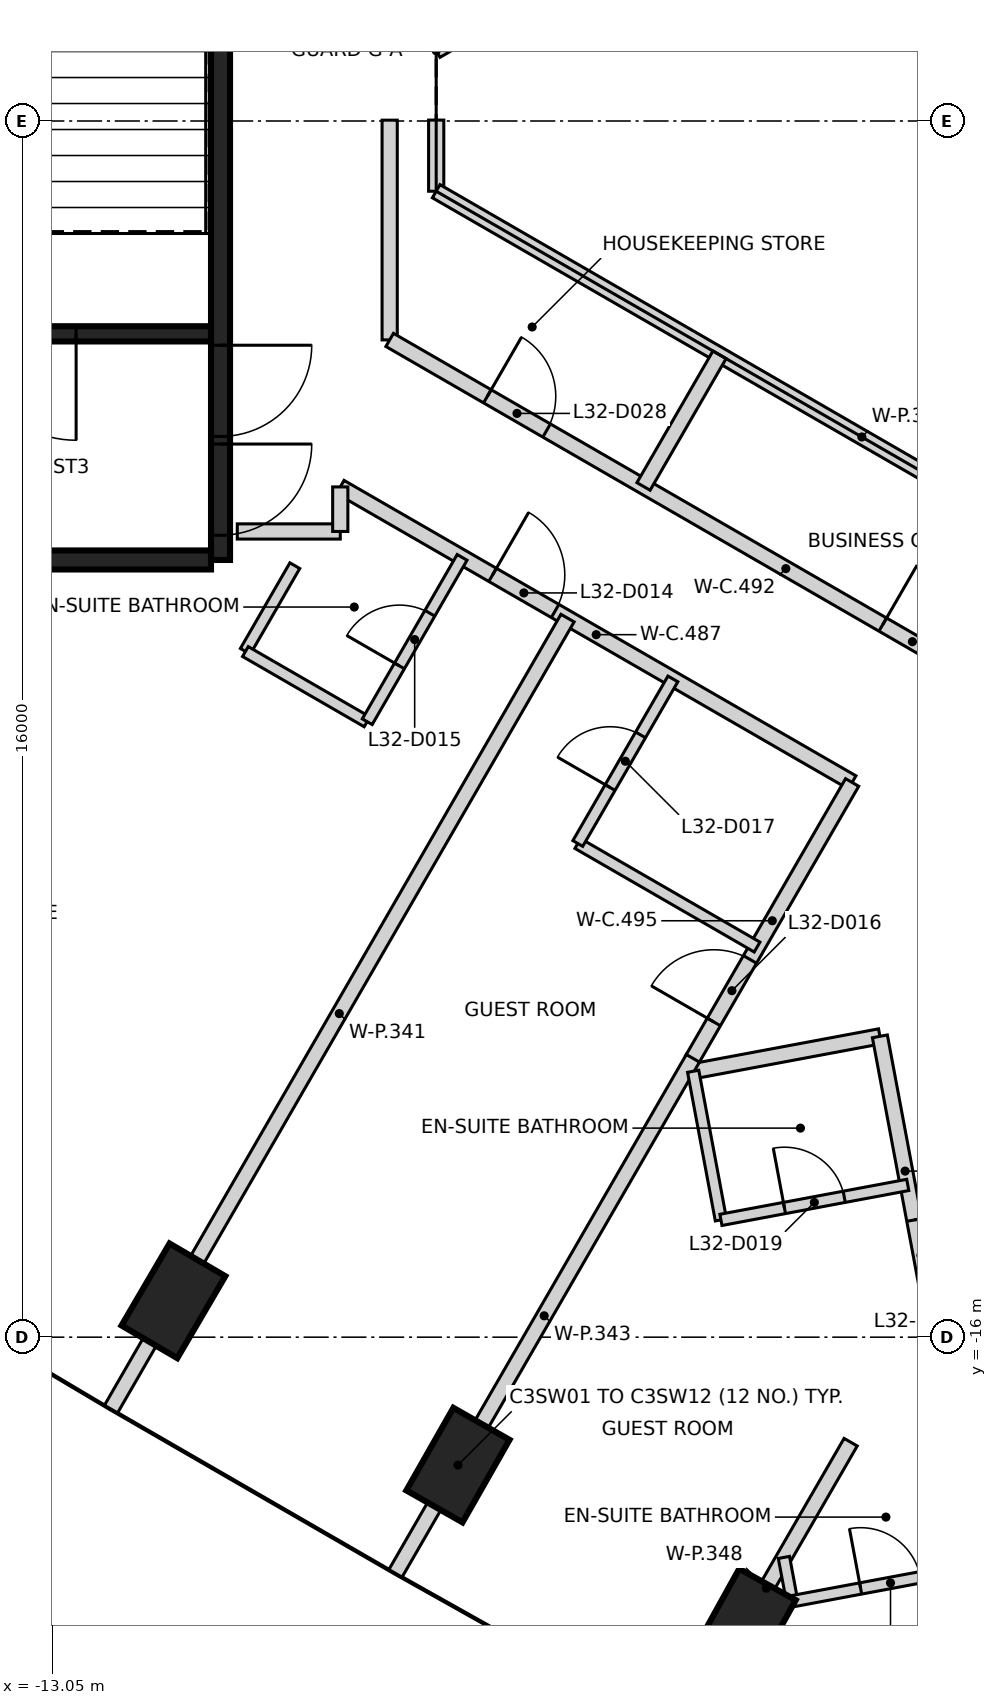
"""IFC4 building model, lengths in metres.
Left out: names, types, materials, properties, quantities, classifications, styles, units other than length and angle.
Written with IfcOpenShell. Run it as: python <this file> out.ifc"""

import sys

from ifc_helpers import new_model, si_unit, direction, frame, frame_2d, origin, origin_2d, place, context, subcontext, project, spatial, rectangle, extrude, element, fill, save


model = new_model("IFC4")
c1 = context("Model", 3, precision=1e-05, world=origin(), true_north=direction((0.0, 1.0)))
c2 = subcontext(c1, "Body", "Model", "MODEL_VIEW")
j1 = project(units=[si_unit("LENGTHUNIT", "METRE"), si_unit("PLANEANGLEUNIT", "RADIAN")], contexts=[c1])
p1 = place(None, origin())
s1 = spatial("IfcSite", under=j1, at=p1, CompositionType="ELEMENT")
p2 = place(p1, origin())
s2 = spatial("IfcBuilding", under=s1, at=p2, CompositionType="ELEMENT")
p3 = place(p2, frame((0.0, 0.0, 132.4)))
s3 = spatial("IfcBuildingStorey", under=s2, at=p3, CompositionType="ELEMENT", Elevation=132.4)
for number, where, z_axis, x_axis in (
    (1, (-11.457, -15.522, -0.4), (0.0, 0.0, 1.0), (0.505, 0.863, 0.0)),
    (2, (-7.714, -17.683, -0.4), (0.0, 0.0, 1.0), (0.495, 0.869, 0.0)),
    (3, (-3.945, -19.8, -0.4), (0.0, 0.0, 1.0), (0.485, 0.875, 0.0)),
):
    element("IfcColumn", number, at=place(p3, frame(where, z_axis=z_axis, x_axis=x_axis)), inside=s3, PredefinedType="COLUMN", context=c2, shape_type="SweptSolid", body=[
        extrude(rectangle(XDim=1.25, YDim=0.85, at=origin_2d()), origin(), (0.0, 0.0, 1.0), 3.6),
    ])
p4 = place(p3, frame((-10.837, 5.775, 0.0), z_axis=(0.0, 0.0, 1.0), x_axis=(0.0, -1.0, 0.0)))
e4 = element("IfcWall", 4, at=p4, inside=s3, PredefinedType="SHEAR", context=c2, shape_type="SweptSolid", body=[
    extrude(rectangle(XDim=11.55, YDim=0.25, at=frame_2d((5.775, 0.0))), origin(), (0.0, 0.0, 1.0), 3.2),
])
p5 = place(p4, frame((10.025, 0.0, 0.0)))
e5 = element("IfcOpeningElement", 5, at=p5, cuts=e4, PredefinedType="OPENING", context=c2, shape_type="SweptSolid", body=[
    extrude(rectangle(XDim=1.2, YDim=2.1, at=frame_2d((0.6, 1.05))), frame((0.0, 0.135, 0.0), z_axis=(0.0, -1.0, 0.0), x_axis=(1.0, 0.0, 0.0)), (0.0, 0.0, 1.0), 0.27),
])
p6 = place(p4, frame((8.725, 0.0, 0.0)))
e6 = element("IfcOpeningElement", 6, at=p6, cuts=e4, PredefinedType="OPENING", context=c2, shape_type="SweptSolid", body=[
    extrude(rectangle(XDim=1.2, YDim=2.1, at=frame_2d((0.6, 1.05))), frame((0.0, 0.135, 0.0), z_axis=(0.0, -1.0, 0.0), x_axis=(1.0, 0.0, 0.0)), (0.0, 0.0, 1.0), 0.27),
])
p7 = place(p3, frame((-10.963, -5.775, 0.0), z_axis=(0.0, 0.0, 1.0), x_axis=(-1.0, 0.0, 0.0)))
e7 = element("IfcWall", 7, at=p7, inside=s3, PredefinedType="SHEAR", context=c2, shape_type="SweptSolid", body=[
    extrude(rectangle(XDim=5.225, YDim=0.25, at=frame_2d((2.612, 0.0))), origin(), (0.0, 0.0, 1.0), 3.2),
])
p8 = place(p3, frame((-10.963, -2.8, 0.0), z_axis=(0.0, 0.0, 1.0), x_axis=(-1.0, 0.0, 0.0)))
e8 = element("IfcWall", 8, at=p8, inside=s3, PredefinedType="SHEAR", context=c2, shape_type="SweptSolid", body=[
    extrude(rectangle(XDim=5.098, YDim=0.2, at=frame_2d((2.549, 0.0))), origin(), (0.0, 0.0, 1.0), 3.2),
])
p9 = place(p8, frame((1.774, 0.0, 0.0)))
e9 = element("IfcOpeningElement", 9, at=p9, cuts=e8, PredefinedType="OPENING", context=c2, shape_type="SweptSolid", body=[
    extrude(rectangle(XDim=1.4, YDim=2.1, at=frame_2d((0.7, 1.05))), frame((0.0, 0.11, 0.0), z_axis=(0.0, -1.0, 0.0), x_axis=(1.0, 0.0, 0.0)), (0.0, 0.0, 1.0), 0.22),
])
p10 = place(p3, frame((-10.617, -5.4, 0.0), z_axis=(0.0, 0.0, 1.0), x_axis=(1.0, 0.0, 0.0)))
e10 = element("IfcWall", 10, at=p10, inside=s3, PredefinedType="PARTITIONING", context=c2, shape_type="SweptSolid", body=[
    extrude(rectangle(XDim=1.355, YDim=0.2, at=frame_2d((0.677, 0.0))), origin(), (0.0, 0.0, 1.0), 3.2),
])
p11 = place(p3, frame((-9.262, -4.814, 0.0), z_axis=(0.0, 0.0, 1.0), x_axis=(0.866109782156, -0.499853823887, 0.0)))
e11 = element("IfcWall", 11, at=p11, inside=s3, PredefinedType="PARTITIONING", context=c2, shape_type="SweptSolid", body=[
    extrude(rectangle(XDim=7.776, YDim=0.2, at=frame_2d((3.888, 0.0))), origin(), (0.0, 0.0, 1.0), 3.2),
])
p12 = place(p11, frame((2.314, 0.0, 0.0)))
e12 = element("IfcOpeningElement", 12, at=p12, cuts=e11, PredefinedType="OPENING", context=c2, shape_type="SweptSolid", body=[
    extrude(rectangle(XDim=0.95, YDim=2.1, at=frame_2d((0.475, 1.05))), frame((0.0, 0.11, 0.0), z_axis=(0.0, -1.0, 0.0), x_axis=(1.0, 0.0, 0.0)), (0.0, 0.0, 1.0), 0.22),
])
p13 = place(p3, frame((-9.262, -5.4, 0.0), z_axis=(0.0, 0.0, 1.0), x_axis=(0.0, 1.0, 0.0)))
e13 = element("IfcWall", 13, at=p13, inside=s3, PredefinedType="PARTITIONING", context=c2, shape_type="SweptSolid", body=[
    extrude(rectangle(XDim=0.586, YDim=0.2, at=frame_2d((0.293, 0.0))), origin(), (0.0, 0.0, 1.0), 3.2),
])
p14 = place(p3, frame((-8.612, -2.88, 0.0), z_axis=(0.0, 0.0, 1.0), x_axis=(0.0, 1.0, 0.0)))
e14 = element("IfcWall", 14, at=p14, inside=s3, PredefinedType="PARTITIONING", context=c2, shape_type="SweptSolid", body=[
    extrude(rectangle(XDim=2.891, YDim=0.2, at=frame_2d((1.445, 0.0))), origin(), (0.0, 0.0, 1.0), 2.3),
])
p15 = place(p3, frame((-8.612, -2.88, 0.0), z_axis=(0.0, 0.0, 1.0), x_axis=(0.866035279512, -0.499982894348, 0.0)))
e15 = element("IfcWall", 15, at=p15, inside=s3, PredefinedType="PARTITIONING", context=c2, shape_type="SweptSolid", body=[
    extrude(rectangle(XDim=12.037, YDim=0.2, at=frame_2d((6.018, 0.0))), origin(), (0.0, 0.0, 1.0), 3.2),
])
p16 = place(p15, frame((1.484, 0.0, 0.0)))
e16 = element("IfcOpeningElement", 16, at=p16, cuts=e15, PredefinedType="OPENING", context=c2, shape_type="SweptSolid", body=[
    extrude(rectangle(XDim=0.9, YDim=2.1, at=frame_2d((0.45, 1.05))), frame((0.0, 0.11, 0.0), z_axis=(0.0, -1.0, 0.0), x_axis=(1.0, 0.0, 0.0)), (0.0, 0.0, 1.0), 0.22),
])
p17 = place(p15, frame((7.491, 0.0, 0.0)))
e17 = element("IfcOpeningElement", 17, at=p17, cuts=e15, PredefinedType="OPENING", context=c2, shape_type="SweptSolid", body=[
    extrude(rectangle(XDim=0.9, YDim=2.1, at=frame_2d((0.45, 1.05))), frame((0.0, 0.11, 0.0), z_axis=(0.0, -1.0, 0.0), x_axis=(1.0, 0.0, 0.0)), (0.0, 0.0, 1.0), 0.22),
])
p18 = place(p3, frame((-4.629, -12.341, 0.0), z_axis=(0.0, 0.0, 1.0), x_axis=(0.500069467685, 0.865985292883, 0.0)))
e18 = element("IfcWall", 18, at=p18, inside=s3, PredefinedType="PARTITIONING", context=c2, shape_type="SweptSolid", body=[
    extrude(rectangle(XDim=4.202, YDim=0.2, at=frame_2d((2.101, 0.0))), origin(), (0.0, 0.0, 1.0), 3.2),
])
p19 = place(p18, frame((0.564, 0.0, 0.0)))
e19 = element("IfcOpeningElement", 19, at=p19, cuts=e18, PredefinedType="OPENING", context=c2, shape_type="SweptSolid", body=[
    extrude(rectangle(XDim=0.95, YDim=2.1, at=frame_2d((0.475, 1.05))), frame((0.0, 0.11, 0.0), z_axis=(0.0, -1.0, 0.0), x_axis=(1.0, 0.0, 0.0)), (0.0, 0.0, 1.0), 0.22),
])
p20 = place(p3, frame((-4.6, -12.498, 0.0), z_axis=(0.0, 0.0, 1.0), x_axis=(0.982950102255, 0.183872500602, 0.0)))
e20 = element("IfcWall", 20, at=p20, inside=s3, PredefinedType="PARTITIONING", context=c2, shape_type="SweptSolid", body=[
    extrude(rectangle(XDim=2.48, YDim=0.2, at=frame_2d((1.24, 0.0))), origin(), (0.0, 0.0, 1.0), 3.2),
])
p21 = place(p3, frame((-2.163, -12.042, 0.0), z_axis=(0.0, 0.0, 1.0), x_axis=(0.183945287989, -0.982936483719, 0.0)))
e21 = element("IfcWall", 21, at=p21, inside=s3, PredefinedType="PARTITIONING", context=c2, shape_type="SweptSolid", body=[
    extrude(rectangle(XDim=3.607, YDim=0.2, at=frame_2d((1.804, 0.0))), origin(), (0.0, 0.0, 1.0), 3.2),
])
p22 = place(p21, frame((2.458, 0.0, 0.0)))
e22 = element("IfcOpeningElement", 22, at=p22, cuts=e21, PredefinedType="OPENING", context=c2, shape_type="SweptSolid", body=[
    extrude(rectangle(XDim=0.95, YDim=2.1, at=frame_2d((0.475, 1.05))), frame((0.0, 0.11, 0.0), z_axis=(0.0, -1.0, 0.0), x_axis=(1.0, 0.0, 0.0)), (0.0, 0.0, 1.0), 0.22),
])
p23 = place(p3, frame((-12.278, -16.946, 0.0), z_axis=(0.0, 0.0, 1.0), x_axis=(0.499887212932, 0.866090511637, 0.0)))
e23 = element("IfcWall", 23, at=p23, inside=s3, PredefinedType="PARTITIONING", context=c2, shape_type="SweptSolid", body=[
    extrude(rectangle(XDim=12.015, YDim=0.2, at=frame_2d((6.007, 0.0))), origin(), (0.0, 0.0, 1.0), 3.2),
])
p24 = place(p3, frame((-8.535, -19.107, 0.0), z_axis=(0.0, 0.0, 1.0), x_axis=(0.500028565219, 0.866008911019, 0.0)))
e24 = element("IfcWall", 24, at=p24, inside=s3, PredefinedType="PARTITIONING", context=c2, shape_type="SweptSolid", body=[
    extrude(rectangle(XDim=7.824, YDim=0.2, at=frame_2d((3.912, 0.0))), origin(), (0.0, 0.0, 1.0), 3.2),
])
p25 = place(p3, frame((-8.0, 0.924, 0.0), z_axis=(0.0, 0.0, 1.0), x_axis=(0.86604129137, 0.499972480886, 0.0)))
e25 = element("IfcWall", 25, at=p25, inside=s3, PredefinedType="PARTITIONING", context=c2, shape_type="SweptSolid", body=[
    extrude(rectangle(XDim=12.932, YDim=0.2, at=frame_2d((6.466, 0.0))), origin(), (0.0, 0.0, 1.0), 2.3),
])
p26 = place(p3, frame((-8.0, -0.924, 0.0), z_axis=(0.0, 0.0, 1.0), x_axis=(0.0, 1.0, 0.0)))
e26 = element("IfcWall", 26, at=p26, inside=s3, PredefinedType="PARTITIONING", context=c2, shape_type="SweptSolid", body=[
    extrude(rectangle(XDim=0.936, YDim=0.2, at=frame_2d((0.468, 0.0))), origin(), (0.0, 0.0, 1.0), 2.3),
])
p27 = place(p3, frame((-8.0, -0.924, 0.0), z_axis=(0.0, 0.0, 1.0), x_axis=(0.86604129137, -0.499972480886, 0.0)))
e27 = element("IfcWall", 27, at=p27, inside=s3, PredefinedType="PARTITIONING", context=c2, shape_type="SweptSolid", body=[
    extrude(rectangle(XDim=12.932, YDim=0.2, at=frame_2d((6.466, 0.0))), origin(), (0.0, 0.0, 1.0), 2.3),
])
p28 = place(p3, frame((-5.272, -4.808, 0.0), z_axis=(0.0, 0.0, 1.0), x_axis=(0.499880961361, 0.866094119867, 0.0)))
e28 = element("IfcWall", 28, at=p28, inside=s3, PredefinedType="PARTITIONING", context=c2, shape_type="SweptSolid", body=[
    extrude(rectangle(XDim=2.0, YDim=0.2, at=frame_2d((1.0, 0.0))), origin(), (0.0, 0.0, 1.0), 2.3),
])
p29 = place(p3, frame((-4.767, -21.223, 0.0), z_axis=(0.0, 0.0, 1.0), x_axis=(0.500305100915, 0.865849182017, 0.0)))
e29 = element("IfcWall", 29, at=p29, inside=s3, PredefinedType="PARTITIONING", context=c2, shape_type="SweptSolid", body=[
    extrude(rectangle(XDim=4.437, YDim=0.2, at=frame_2d((2.218, 0.0))), origin(), (0.0, 0.0, 1.0), 3.2),
])
p30 = place(p3, frame((-10.511, -6.977, 0.0), z_axis=(0.0, 0.0, 1.0), x_axis=(0.500274472704, 0.865866878891, 0.0)))
e30 = element("IfcWall", 30, at=p30, inside=s3, PredefinedType="PARTITIONING", context=c2, shape_type="SweptSolid", body=[
    extrude(rectangle(XDim=1.302, YDim=0.15, at=frame_2d((0.651, 0.0))), origin(), (0.0, 0.0, 1.0), 3.2),
])
p31 = place(p3, frame((-10.51, -6.98, 0.0), z_axis=(0.0, 0.0, 1.0), x_axis=(0.865965533559, -0.500103683937, 0.0)))
e31 = element("IfcWall", 31, at=p31, inside=s3, PredefinedType="PARTITIONING", context=c2, shape_type="SweptSolid", body=[
    extrude(rectangle(XDim=1.848, YDim=0.15, at=frame_2d((0.924, 0.0))), origin(), (0.0, 0.0, 1.0), 3.2),
])
p32 = place(p3, frame((-8.907, -7.903, 0.0), z_axis=(0.0, 0.0, 1.0), x_axis=(0.499925626596, 0.866068339032, 0.0)))
e32 = element("IfcWall", 32, at=p32, inside=s3, PredefinedType="PARTITIONING", context=c2, shape_type="SweptSolid", body=[
    extrude(rectangle(XDim=2.497, YDim=0.15, at=frame_2d((1.248, 0.0))), origin(), (0.0, 0.0, 1.0), 3.2),
])
p33 = place(p32, frame((0.848, 0.0, 0.0)))
e33 = element("IfcOpeningElement", 33, at=p33, cuts=e32, PredefinedType="OPENING", context=c2, shape_type="SweptSolid", body=[
    extrude(rectangle(XDim=0.8, YDim=2.1, at=frame_2d((0.4, 1.05))), frame((0.0, 0.085, 0.0), z_axis=(0.0, -1.0, 0.0), x_axis=(1.0, 0.0, 0.0)), (0.0, 0.0, 1.0), 0.17),
])
p34 = place(p3, frame((-6.137, -9.505, 0.0), z_axis=(0.0, 0.0, 1.0), x_axis=(0.866000497904, -0.50004313577, 0.0)))
e34 = element("IfcWall", 34, at=p34, inside=s3, PredefinedType="PARTITIONING", context=c2, shape_type="SweptSolid", body=[
    extrude(rectangle(XDim=2.724, YDim=0.15, at=frame_2d((1.362, 0.0))), origin(), (0.0, 0.0, 1.0), 3.2),
])
p35 = place(p3, frame((-6.137, -9.505, 0.0), z_axis=(0.0, 0.0, 1.0), x_axis=(0.500339416332, 0.86582935297, 0.0)))
e35 = element("IfcWall", 35, at=p35, inside=s3, PredefinedType="PARTITIONING", context=c2, shape_type="SweptSolid", body=[
    extrude(rectangle(XDim=2.5, YDim=0.15, at=frame_2d((1.25, 0.0))), origin(), (0.0, 0.0, 1.0), 3.2),
])
p36 = place(p35, frame((0.85, 0.0, 0.0)))
e36 = element("IfcOpeningElement", 36, at=p36, cuts=e35, PredefinedType="OPENING", context=c2, shape_type="SweptSolid", body=[
    extrude(rectangle(XDim=0.8, YDim=2.1, at=frame_2d((0.4, 1.05))), frame((0.0, 0.085, 0.0), z_axis=(0.0, -1.0, 0.0), x_axis=(1.0, 0.0, 0.0)), (0.0, 0.0, 1.0), 0.17),
])
p37 = place(p3, frame((-4.619, -12.502, 0.0), z_axis=(0.0, 0.0, 1.0), x_axis=(0.183517674038, -0.983016410502, 0.0)))
e37 = element("IfcWall", 37, at=p37, inside=s3, PredefinedType="PARTITIONING", context=c2, shape_type="SweptSolid", body=[
    extrude(rectangle(XDim=1.989, YDim=0.15, at=frame_2d((0.994, 0.0))), origin(), (0.0, 0.0, 1.0), 3.2),
])
p38 = place(p3, frame((-4.254, -14.457, 0.0), z_axis=(0.0, 0.0, 1.0), x_axis=(0.98293843799, 0.183934844773, 0.0)))
e38 = element("IfcWall", 38, at=p38, inside=s3, PredefinedType="PARTITIONING", context=c2, shape_type="SweptSolid", body=[
    extrude(rectangle(XDim=2.501, YDim=0.15, at=frame_2d((1.25, 0.0))), origin(), (0.0, 0.0, 1.0), 3.2),
])
p39 = place(p38, frame((0.85, 0.0, 0.0)))
e39 = element("IfcOpeningElement", 39, at=p39, cuts=e38, PredefinedType="OPENING", context=c2, shape_type="SweptSolid", body=[
    extrude(rectangle(XDim=0.8, YDim=2.1, at=frame_2d((0.4, 1.05))), frame((0.0, 0.085, 0.0), z_axis=(0.0, -1.0, 0.0), x_axis=(1.0, 0.0, 0.0)), (0.0, 0.0, 1.0), 0.17),
])
p40 = place(p3, frame((-3.425, -18.897, 0.0), z_axis=(0.0, 0.0, 1.0), x_axis=(0.183861553242, -0.982952150025, 0.0)))
e40 = element("IfcWall", 40, at=p40, inside=s3, PredefinedType="PARTITIONING", context=c2, shape_type="SweptSolid", body=[
    extrude(rectangle(XDim=0.587, YDim=0.15, at=frame_2d((0.293, 0.0))), origin(), (0.0, 0.0, 1.0), 3.2),
])
p41 = place(p3, frame((-3.315, -19.474, 0.0), z_axis=(0.0, 0.0, 1.0), x_axis=(0.982978173855, 0.183722371326, 0.0)))
e41 = element("IfcWall", 41, at=p41, inside=s3, PredefinedType="PARTITIONING", context=c2, shape_type="SweptSolid", body=[
    extrude(rectangle(XDim=2.5, YDim=0.15, at=frame_2d((1.25, 0.0))), origin(), (0.0, 0.0, 1.0), 3.2),
])
p42 = place(p41, frame((0.915, 0.0, 0.0)))
e42 = element("IfcOpeningElement", 42, at=p42, cuts=e41, PredefinedType="OPENING", context=c2, shape_type="SweptSolid", body=[
    extrude(rectangle(XDim=0.8, YDim=2.1, at=frame_2d((0.4, 1.05))), frame((0.0, 0.085, 0.0), z_axis=(0.0, -1.0, 0.0), x_axis=(1.0, 0.0, 0.0)), (0.0, 0.0, 1.0), 0.17),
])
p43 = place(p5, origin())
e43 = element("IfcDoor", 43, at=p43, inside=s3, OperationType="SINGLE_SWING_LEFT", PredefinedType="DOOR", context=c2, shape_type="SweptSolid", body=[
    extrude(rectangle(XDim=1.2, YDim=2.1, at=frame_2d((0.6, 1.05))), frame((0.0, 0.025, 0.0), z_axis=(0.0, -1.0, 0.0), x_axis=(1.0, 0.0, 0.0)), (0.0, 0.0, 1.0), 0.05),
])
fill(e5, e43)
p44 = place(p6, origin())
e44 = element("IfcDoor", 44, at=p44, inside=s3, OperationType="SINGLE_SWING_RIGHT", PredefinedType="DOOR", context=c2, shape_type="SweptSolid", body=[
    extrude(rectangle(XDim=1.2, YDim=2.1, at=frame_2d((0.6, 1.05))), frame((0.0, 0.025, 0.0), z_axis=(0.0, -1.0, 0.0), x_axis=(1.0, 0.0, 0.0)), (0.0, 0.0, 1.0), 0.05),
])
fill(e6, e44)
p45 = place(p9, origin())
e45 = element("IfcDoor", 45, at=p45, inside=s3, OperationType="SINGLE_SWING_RIGHT", PredefinedType="DOOR", context=c2, shape_type="SweptSolid", body=[
    extrude(rectangle(XDim=1.4, YDim=2.1, at=frame_2d((0.7, 1.05))), frame((0.0, 0.025, 0.0), z_axis=(0.0, -1.0, 0.0), x_axis=(1.0, 0.0, 0.0)), (0.0, 0.0, 1.0), 0.05),
])
fill(e9, e45)
p46 = place(p12, frame((0.95, 0.0, 0.0), z_axis=(0.0, 0.0, 1.0), x_axis=(-1.0, 0.0, 0.0)))
e46 = element("IfcDoor", 46, at=p46, inside=s3, OperationType="SINGLE_SWING_LEFT", PredefinedType="DOOR", context=c2, shape_type="SweptSolid", body=[
    extrude(rectangle(XDim=0.95, YDim=2.1, at=frame_2d((0.475, 1.05))), frame((0.0, 0.025, 0.0), z_axis=(0.0, -1.0, 0.0), x_axis=(1.0, 0.0, 0.0)), (0.0, 0.0, 1.0), 0.05),
])
fill(e12, e46)
p47 = place(p33, origin())
e47 = element("IfcDoor", 47, at=p47, inside=s3, OperationType="SINGLE_SWING_LEFT", PredefinedType="DOOR", context=c2, shape_type="SweptSolid", body=[
    extrude(rectangle(XDim=0.8, YDim=2.1, at=frame_2d((0.4, 1.05))), frame((0.0, 0.025, 0.0), z_axis=(0.0, -1.0, 0.0), x_axis=(1.0, 0.0, 0.0)), (0.0, 0.0, 1.0), 0.05),
])
fill(e33, e47)
p48 = place(p19, origin())
e48 = element("IfcDoor", 48, at=p48, inside=s3, OperationType="SINGLE_SWING_LEFT", PredefinedType="DOOR", context=c2, shape_type="SweptSolid", body=[
    extrude(rectangle(XDim=0.95, YDim=2.1, at=frame_2d((0.475, 1.05))), frame((0.0, 0.025, 0.0), z_axis=(0.0, -1.0, 0.0), x_axis=(1.0, 0.0, 0.0)), (0.0, 0.0, 1.0), 0.05),
])
fill(e19, e48)
p49 = place(p36, frame((0.8, 0.0, 0.0), z_axis=(0.0, 0.0, 1.0), x_axis=(-1.0, 0.0, 0.0)))
e49 = element("IfcDoor", 49, at=p49, inside=s3, OperationType="SINGLE_SWING_LEFT", PredefinedType="DOOR", context=c2, shape_type="SweptSolid", body=[
    extrude(rectangle(XDim=0.8, YDim=2.1, at=frame_2d((0.4, 1.05))), frame((0.0, 0.025, 0.0), z_axis=(0.0, -1.0, 0.0), x_axis=(1.0, 0.0, 0.0)), (0.0, 0.0, 1.0), 0.05),
])
fill(e36, e49)
p50 = place(p22, frame((0.95, 0.0, 0.0), z_axis=(0.0, 0.0, 1.0), x_axis=(-1.0, 0.0, 0.0)))
e50 = element("IfcDoor", 50, at=p50, inside=s3, OperationType="SINGLE_SWING_LEFT", PredefinedType="DOOR", context=c2, shape_type="SweptSolid", body=[
    extrude(rectangle(XDim=0.95, YDim=2.1, at=frame_2d((0.475, 1.05))), frame((0.0, 0.025, 0.0), z_axis=(0.0, -1.0, 0.0), x_axis=(1.0, 0.0, 0.0)), (0.0, 0.0, 1.0), 0.05),
])
fill(e22, e50)
p51 = place(p39, frame((0.8, 0.0, 0.0), z_axis=(0.0, 0.0, 1.0), x_axis=(-1.0, 0.0, 0.0)))
e51 = element("IfcDoor", 51, at=p51, inside=s3, OperationType="SINGLE_SWING_LEFT", PredefinedType="DOOR", context=c2, shape_type="SweptSolid", body=[
    extrude(rectangle(XDim=0.8, YDim=2.1, at=frame_2d((0.4, 1.05))), frame((0.0, 0.025, 0.0), z_axis=(0.0, -1.0, 0.0), x_axis=(1.0, 0.0, 0.0)), (0.0, 0.0, 1.0), 0.05),
])
fill(e39, e51)
p52 = place(p42, frame((0.8, 0.0, 0.0), z_axis=(0.0, 0.0, 1.0), x_axis=(-1.0, 0.0, 0.0)))
e52 = element("IfcDoor", 52, at=p52, inside=s3, OperationType="SINGLE_SWING_LEFT", PredefinedType="DOOR", context=c2, shape_type="SweptSolid", body=[
    extrude(rectangle(XDim=0.8, YDim=2.1, at=frame_2d((0.4, 1.05))), frame((0.0, 0.025, 0.0), z_axis=(0.0, -1.0, 0.0), x_axis=(1.0, 0.0, 0.0)), (0.0, 0.0, 1.0), 0.05),
])
fill(e42, e52)
p53 = place(p16, origin())
e53 = element("IfcDoor", 53, at=p53, inside=s3, OperationType="SINGLE_SWING_LEFT", PredefinedType="DOOR", context=c2, shape_type="SweptSolid", body=[
    extrude(rectangle(XDim=0.9, YDim=2.1, at=frame_2d((0.45, 1.05))), frame((0.0, 0.025, 0.0), z_axis=(0.0, -1.0, 0.0), x_axis=(1.0, 0.0, 0.0)), (0.0, 0.0, 1.0), 0.05),
])
fill(e16, e53)
p54 = place(p17, origin())
e54 = element("IfcDoor", 54, at=p54, inside=s3, OperationType="SINGLE_SWING_LEFT", PredefinedType="DOOR", context=c2, shape_type="SweptSolid", body=[
    extrude(rectangle(XDim=0.9, YDim=2.1, at=frame_2d((0.45, 1.05))), frame((0.0, 0.025, 0.0), z_axis=(0.0, -1.0, 0.0), x_axis=(1.0, 0.0, 0.0)), (0.0, 0.0, 1.0), 0.05),
])
fill(e17, e54)
save(model, sys.argv[1])
